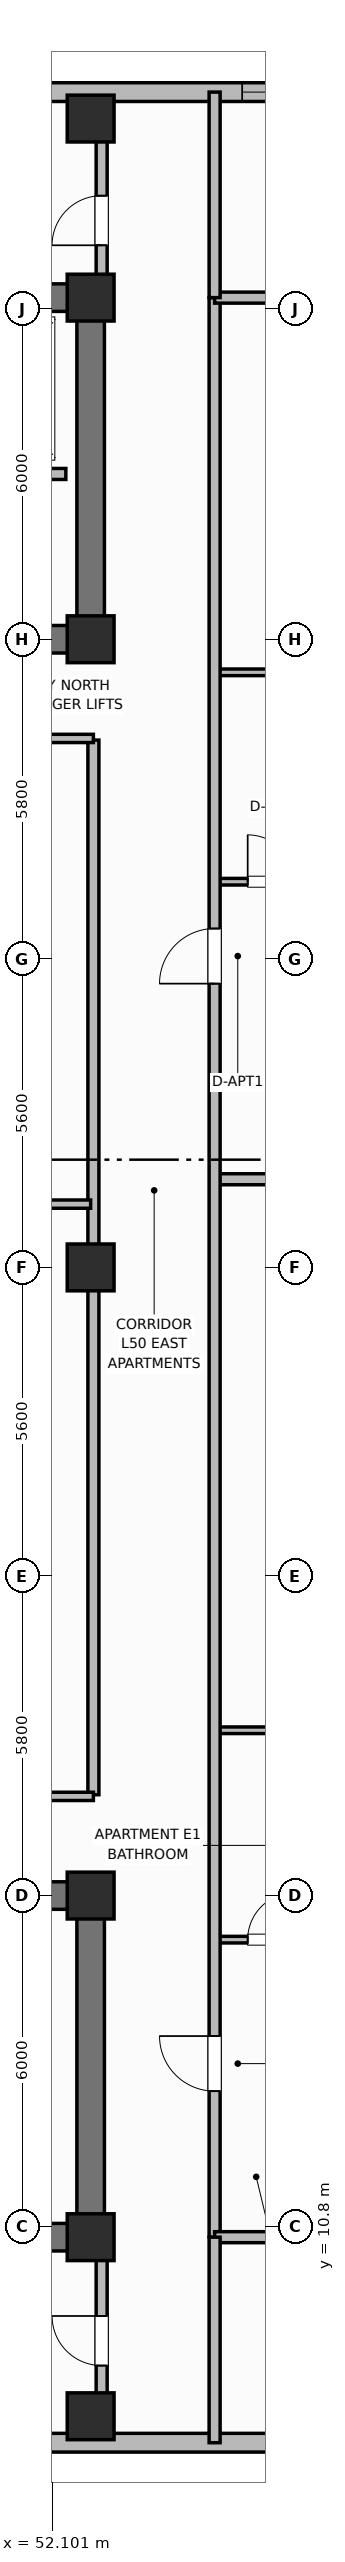
"""IFC4 building model, lengths in metres.
Left out: names, types, materials, properties, quantities, classifications, styles, units other than length and angle.
Written with IfcOpenShell. Run it as: python <this file> out.ifc"""

import sys

from ifc_helpers import new_model, si_unit, direction, frame, frame_2d, origin, origin_2d, place, context, subcontext, project, spatial, rectangle, extrude, element, fill, save


model = new_model("IFC4")
c1 = context("Model", 3, precision=1e-05, world=origin(), true_north=direction((0.0, 1.0)))
c2 = subcontext(c1, "Body", "Model", "MODEL_VIEW")
j1 = project(units=[si_unit("LENGTHUNIT", "METRE"), si_unit("PLANEANGLEUNIT", "RADIAN")], contexts=[c1])
p1 = place(None, origin())
s1 = spatial("IfcSite", under=j1, at=p1, CompositionType="ELEMENT")
p2 = place(p1, origin())
s2 = spatial("IfcBuilding", under=s1, at=p2, CompositionType="ELEMENT")
p3 = place(p2, frame((0.0, 0.0, 203.1)))
s3 = spatial("IfcBuildingStorey", under=s2, at=p3, CompositionType="ELEMENT", Elevation=203.1)
p4 = place(p3, frame((52.8, 10.6, 0.0), z_axis=(0.0, 0.0, 1.0), x_axis=(-1.0, 0.0, 0.0)))
e1 = element("IfcWall", 1, at=p4, inside=s3, PredefinedType="SHEAR", context=c2, shape_type="SweptSolid", body=[
    extrude(rectangle(XDim=27.2, YDim=0.5, at=frame_2d((13.6, 0.0))), origin(), (0.0, 0.0, 1.0), 4.2),
])
p5 = place(p3, frame((52.8, 10.85, 0.0), z_axis=(0.0, 0.0, 1.0), x_axis=(0.0, 1.0, 0.0)))
e2 = element("IfcWall", 2, at=p5, inside=s3, PredefinedType="SHEAR", context=c2, shape_type="SweptSolid", body=[
    extrude(rectangle(XDim=5.7, YDim=0.5, at=frame_2d((2.85, 0.0))), origin(), (0.0, 0.0, 1.0), 4.2),
])
p6 = place(p3, frame((25.6, 16.8, 0.0), z_axis=(0.0, 0.0, 1.0), x_axis=(1.0, 0.0, 0.0)))
e3 = element("IfcWall", 3, at=p6, inside=s3, PredefinedType="SHEAR", context=c2, shape_type="SweptSolid", body=[
    extrude(rectangle(XDim=27.2, YDim=0.5, at=frame_2d((13.6, 0.0))), origin(), (0.0, 0.0, 1.0), 4.2),
])
p7 = place(p6, frame((1.8, 0.0, 0.0)))
e4 = element("IfcOpeningElement", 4, at=p7, cuts=e3, PredefinedType="OPENING", context=c2, shape_type="SweptSolid", body=[
    extrude(rectangle(XDim=1.1, YDim=2.15, at=frame_2d((0.55, 1.075))), frame((0.0, 0.26, 0.0), z_axis=(0.0, -1.0, 0.0), x_axis=(1.0, 0.0, 0.0)), (0.0, 0.0, 1.0), 0.52),
])
p8 = place(p6, frame((5.6, 0.0, 0.0)))
e5 = element("IfcOpeningElement", 5, at=p8, cuts=e3, PredefinedType="OPENING", context=c2, shape_type="SweptSolid", body=[
    extrude(rectangle(XDim=0.85, YDim=2.1, at=frame_2d((0.425, 1.05))), frame((0.0, 0.26, 0.0), z_axis=(0.0, -1.0, 0.0), x_axis=(1.0, 0.0, 0.0)), (0.0, 0.0, 1.0), 0.52),
])
p9 = place(p6, frame((13.0, 0.0, 0.0)))
e6 = element("IfcOpeningElement", 6, at=p9, cuts=e3, PredefinedType="OPENING", context=c2, shape_type="SweptSolid", body=[
    extrude(rectangle(XDim=1.2, YDim=2.15, at=frame_2d((0.6, 1.075))), frame((0.0, 0.26, 0.0), z_axis=(0.0, -1.0, 0.0), x_axis=(1.0, 0.0, 0.0)), (0.0, 0.0, 1.0), 0.52),
])
p10 = place(p6, frame((19.2, 0.0, 0.0)))
e7 = element("IfcOpeningElement", 7, at=p10, cuts=e3, PredefinedType="OPENING", context=c2, shape_type="SweptSolid", body=[
    extrude(rectangle(XDim=0.85, YDim=2.1, at=frame_2d((0.425, 1.05))), frame((0.0, 0.26, 0.0), z_axis=(0.0, -1.0, 0.0), x_axis=(1.0, 0.0, 0.0)), (0.0, 0.0, 1.0), 0.52),
])
p11 = place(p6, frame((23.8, 0.0, 0.0)))
e8 = element("IfcOpeningElement", 8, at=p11, cuts=e3, PredefinedType="OPENING", context=c2, shape_type="SweptSolid", body=[
    extrude(rectangle(XDim=0.9, YDim=2.1, at=frame_2d((0.45, 1.05))), frame((0.0, 0.26, 0.0), z_axis=(0.0, -1.0, 0.0), x_axis=(1.0, 0.0, 0.0)), (0.0, 0.0, 1.0), 0.52),
])
p12 = place(p3, frame((25.6, 45.8, 0.0), z_axis=(0.0, 0.0, 1.0), x_axis=(1.0, 0.0, 0.0)))
e9 = element("IfcWall", 9, at=p12, inside=s3, PredefinedType="SHEAR", context=c2, shape_type="SweptSolid", body=[
    extrude(rectangle(XDim=27.2, YDim=0.5, at=frame_2d((13.6, 0.0))), origin(), (0.0, 0.0, 1.0), 4.2),
])
p13 = place(p3, frame((52.8, 39.85, 0.0), z_axis=(0.0, 0.0, 1.0), x_axis=(0.0, 1.0, 0.0)))
e10 = element("IfcWall", 10, at=p13, inside=s3, PredefinedType="SHEAR", context=c2, shape_type="SweptSolid", body=[
    extrude(rectangle(XDim=5.7, YDim=0.5, at=frame_2d((2.85, 0.0))), origin(), (0.0, 0.0, 1.0), 4.2),
])
p14 = place(p3, frame((52.8, 39.6, 0.0), z_axis=(0.0, 0.0, 1.0), x_axis=(-1.0, 0.0, 0.0)))
e11 = element("IfcWall", 11, at=p14, inside=s3, PredefinedType="SHEAR", context=c2, shape_type="SweptSolid", body=[
    extrude(rectangle(XDim=27.2, YDim=0.5, at=frame_2d((13.6, 0.0))), origin(), (0.0, 0.0, 1.0), 4.2),
])
p15 = place(p14, frame((24.2, 0.0, 0.0)))
e12 = element("IfcOpeningElement", 12, at=p15, cuts=e11, PredefinedType="OPENING", context=c2, shape_type="SweptSolid", body=[
    extrude(rectangle(XDim=1.1, YDim=2.15, at=frame_2d((0.55, 1.075))), frame((0.0, 0.26, 0.0), z_axis=(0.0, -1.0, 0.0), x_axis=(1.0, 0.0, 0.0)), (0.0, 0.0, 1.0), 0.52),
])
p16 = place(p14, frame((20.55, 0.0, 0.0)))
e13 = element("IfcOpeningElement", 13, at=p16, cuts=e11, PredefinedType="OPENING", context=c2, shape_type="SweptSolid", body=[
    extrude(rectangle(XDim=0.95, YDim=2.1, at=frame_2d((0.475, 1.05))), frame((0.0, 0.26, 0.0), z_axis=(0.0, -1.0, 0.0), x_axis=(1.0, 0.0, 0.0)), (0.0, 0.0, 1.0), 0.52),
])
p17 = place(p14, frame((15.1, 0.0, 0.0)))
e14 = element("IfcOpeningElement", 14, at=p17, cuts=e11, PredefinedType="OPENING", context=c2, shape_type="SweptSolid", body=[
    extrude(rectangle(XDim=1.2, YDim=2.15, at=frame_2d((0.6, 1.075))), frame((0.0, 0.26, 0.0), z_axis=(0.0, -1.0, 0.0), x_axis=(1.0, 0.0, 0.0)), (0.0, 0.0, 1.0), 0.52),
])
p18 = place(p14, frame((13.05, 0.0, 0.0)))
e15 = element("IfcOpeningElement", 15, at=p18, cuts=e11, PredefinedType="OPENING", context=c2, shape_type="SweptSolid", body=[
    extrude(rectangle(XDim=0.85, YDim=2.1, at=frame_2d((0.425, 1.05))), frame((0.0, 0.26, 0.0), z_axis=(0.0, -1.0, 0.0), x_axis=(1.0, 0.0, 0.0)), (0.0, 0.0, 1.0), 0.52),
])
p19 = place(p14, frame((11.0, 0.0, 0.0)))
e16 = element("IfcOpeningElement", 16, at=p19, cuts=e11, PredefinedType="OPENING", context=c2, shape_type="SweptSolid", body=[
    extrude(rectangle(XDim=0.85, YDim=2.1, at=frame_2d((0.425, 1.05))), frame((0.0, 0.26, 0.0), z_axis=(0.0, -1.0, 0.0), x_axis=(1.0, 0.0, 0.0)), (0.0, 0.0, 1.0), 0.52),
])
p20 = place(p14, frame((7.35, 0.0, 0.0)))
e17 = element("IfcOpeningElement", 17, at=p20, cuts=e11, PredefinedType="OPENING", context=c2, shape_type="SweptSolid", body=[
    extrude(rectangle(XDim=0.85, YDim=2.1, at=frame_2d((0.425, 1.05))), frame((0.0, 0.26, 0.0), z_axis=(0.0, -1.0, 0.0), x_axis=(1.0, 0.0, 0.0)), (0.0, 0.0, 1.0), 0.52),
])
p21 = place(p14, frame((4.2, 0.0, 0.0)))
e18 = element("IfcOpeningElement", 18, at=p21, cuts=e11, PredefinedType="OPENING", context=c2, shape_type="SweptSolid", body=[
    extrude(rectangle(XDim=1.3, YDim=2.2, at=frame_2d((0.65, 1.1))), frame((0.0, 0.26, 0.0), z_axis=(0.0, -1.0, 0.0), x_axis=(1.0, 0.0, 0.0)), (0.0, 0.0, 1.0), 0.52),
])
for number, where, z_axis, x_axis in (
    (19, (52.8, 10.6, 0.0), (0.0, 0.0, 1.0), (1.0, 0.0, 0.0)),
    (20, (52.8, 16.8, 0.0), (0.0, 0.0, 1.0), (1.0, 0.0, 0.0)),
    (21, (52.8, 39.6, 0.0), (0.0, 0.0, 1.0), (1.0, 0.0, 0.0)),
    (22, (52.8, 45.8, 0.0), (0.0, 0.0, 1.0), (1.0, 0.0, 0.0)),
    (23, (52.8, 28.2, 0.0), (0.0, 0.0, 1.0), (1.0, 0.0, 0.0)),
    (24, (52.8, 7.35, 0.0), (0.0, 0.0, 1.0), (1.0, 0.0, 0.0)),
    (25, (52.8, 49.05, 0.0), (0.0, 0.0, 1.0), (1.0, 0.0, 0.0)),
):
    element("IfcColumn", number, at=place(p3, frame(where, z_axis=z_axis, x_axis=x_axis)), inside=s3, PredefinedType="COLUMN", context=c2, shape_type="SweptSolid", body=[
        extrude(rectangle(XDim=0.85, YDim=0.85, at=origin_2d()), origin(), (0.0, 0.0, 1.0), 4.2),
    ])
p22 = place(p3, frame((51.25, 6.87, 0.0), z_axis=(0.0, 0.0, 1.0), x_axis=(1.0, 0.0, 0.0)))
e26 = element("IfcWall", 26, at=p22, inside=s3, PredefinedType="SOLIDWALL", context=c2, shape_type="SweptSolid", body=[
    extrude(rectangle(XDim=6.95, YDim=0.34, at=frame_2d((3.475, 0.0))), origin(), (0.0, 0.0, 1.0), 3.22),
])
p23 = place(p3, frame((58.2, 49.53, 0.0), z_axis=(0.0, 0.0, 1.0), x_axis=(-1.0, 0.0, 0.0)))
e27 = element("IfcWall", 27, at=p23, inside=s3, PredefinedType="SOLIDWALL", context=c2, shape_type="SweptSolid", body=[
    extrude(rectangle(XDim=15.8, YDim=0.34, at=frame_2d((7.9, 0.0))), origin(), (0.0, 0.0, 1.0), 3.22),
])
p24 = place(p23, frame((1.55, 0.0, 0.95)))
e28 = element("IfcOpeningElement", 28, at=p24, cuts=e27, PredefinedType="OPENING", context=c2, shape_type="SweptSolid", body=[
    extrude(rectangle(XDim=1.1, YDim=1.65, at=frame_2d((0.55, 0.825))), frame((0.0, 0.18, 0.0), z_axis=(0.0, -1.0, 0.0), x_axis=(1.0, 0.0, 0.0)), (0.0, 0.0, 1.0), 0.36),
])
p25 = place(p23, frame((7.35, 0.0, 0.95)))
e29 = element("IfcOpeningElement", 29, at=p25, cuts=e27, PredefinedType="OPENING", context=c2, shape_type="SweptSolid", body=[
    extrude(rectangle(XDim=1.1, YDim=1.65, at=frame_2d((0.55, 0.825))), frame((0.0, 0.18, 0.0), z_axis=(0.0, -1.0, 0.0), x_axis=(1.0, 0.0, 0.0)), (0.0, 0.0, 1.0), 0.36),
])
p26 = place(p23, frame((11.3, 0.0, 0.95)))
e30 = element("IfcOpeningElement", 30, at=p26, cuts=e27, PredefinedType="OPENING", context=c2, shape_type="SweptSolid", body=[
    extrude(rectangle(XDim=1.1, YDim=1.65, at=frame_2d((0.55, 0.825))), frame((0.0, 0.18, 0.0), z_axis=(0.0, -1.0, 0.0), x_axis=(1.0, 0.0, 0.0)), (0.0, 0.0, 1.0), 0.36),
])
p27 = place(p3, frame((52.35, 42.6, 0.0), z_axis=(0.0, 0.0, 1.0), x_axis=(-1.0, 0.0, 0.0)))
e31 = element("IfcWall", 31, at=p27, inside=s3, PredefinedType="PARTITIONING", context=c2, shape_type="SweptSolid", body=[
    extrude(rectangle(XDim=6.5, YDim=0.2, at=frame_2d((3.25, 0.0))), origin(), (0.0, 0.0, 1.0), 3.05),
])
p28 = place(p27, frame((4.9, 0.0, 0.0)))
e32 = element("IfcOpeningElement", 32, at=p28, cuts=e31, PredefinedType="OPENING", context=c2, shape_type="SweptSolid", body=[
    extrude(rectangle(XDim=1.0, YDim=2.15, at=frame_2d((0.5, 1.075))), frame((0.0, 0.11, 0.0), z_axis=(0.0, -1.0, 0.0), x_axis=(1.0, 0.0, 0.0)), (0.0, 0.0, 1.0), 0.22),
])
p29 = place(p27, frame((2.8, 0.0, 0.0)))
e33 = element("IfcOpeningElement", 33, at=p29, cuts=e31, PredefinedType="OPENING", context=c2, shape_type="SweptSolid", body=[
    extrude(rectangle(XDim=1.0, YDim=2.15, at=frame_2d((0.5, 1.075))), frame((0.0, 0.11, 0.0), z_axis=(0.0, -1.0, 0.0), x_axis=(1.0, 0.0, 0.0)), (0.0, 0.0, 1.0), 0.22),
])
p30 = place(p27, frame((0.7, 0.0, 0.0)))
e34 = element("IfcOpeningElement", 34, at=p30, cuts=e31, PredefinedType="OPENING", context=c2, shape_type="SweptSolid", body=[
    extrude(rectangle(XDim=1.0, YDim=2.15, at=frame_2d((0.5, 1.075))), frame((0.0, 0.11, 0.0), z_axis=(0.0, -1.0, 0.0), x_axis=(1.0, 0.0, 0.0)), (0.0, 0.0, 1.0), 0.22),
])
p31 = place(p3, frame((52.85, 18.63, 0.0), z_axis=(0.0, 0.0, 1.0), x_axis=(0.0, 1.0, 0.0)))
e35 = element("IfcWall", 35, at=p31, inside=s3, PredefinedType="PARTITIONING", context=c2, shape_type="SweptSolid", body=[
    extrude(rectangle(XDim=19.14, YDim=0.2, at=frame_2d((9.57, 0.0))), origin(), (0.0, 0.0, 1.0), 3.05),
])
for number, where, z_axis, x_axis in (
    (36, (31.35, 18.6, 0.0), (0.0, 0.0, 1.0), (1.0, 0.0, 0.0)),
    (37, (31.35, 37.8, 0.0), (0.0, 0.0, 1.0), (1.0, 0.0, 0.0)),
):
    element("IfcWall", number, at=place(p3, frame(where, z_axis=z_axis, x_axis=x_axis)), inside=s3, PredefinedType="PARTITIONING", context=c2, shape_type="SweptSolid", body=[
        extrude(rectangle(XDim=21.5, YDim=0.15, at=frame_2d((10.75, 0.0))), origin(), (0.0, 0.0, 1.0), 3.05),
    ])
p32 = place(p3, frame((31.38, 29.348, 0.0), z_axis=(0.0, 0.0, 1.0), x_axis=(1.0, 0.0, 0.0)))
e38 = element("IfcWall", 38, at=p32, inside=s3, PredefinedType="PARTITIONING", context=c2, shape_type="SweptSolid", body=[
    extrude(rectangle(XDim=21.42, YDim=0.15, at=frame_2d((10.71, 0.0))), origin(), (0.0, 0.0, 1.0), 3.05),
])
p33 = place(p3, frame((55.05, 16.0, 0.0), z_axis=(0.0, 0.0, 1.0), x_axis=(1.0, 0.0, 0.0)))
e39 = element("IfcWall", 39, at=p33, inside=s3, PredefinedType="PARTITIONING", context=c2, shape_type="SweptSolid", body=[
    extrude(rectangle(XDim=2.25, YDim=0.12, at=frame_2d((1.125, 0.0))), origin(), (0.0, 0.0, 1.0), 3.05),
])
p34 = place(p33, frame((0.6, 0.0, 0.0)))
e40 = element("IfcOpeningElement", 40, at=p34, cuts=e39, PredefinedType="OPENING", context=c2, shape_type="SweptSolid", body=[
    extrude(rectangle(XDim=0.85, YDim=2.1, at=frame_2d((0.425, 1.05))), frame((0.0, 0.07, 0.0), z_axis=(0.0, -1.0, 0.0), x_axis=(1.0, 0.0, 0.0)), (0.0, 0.0, 1.0), 0.14),
])
p35 = place(p3, frame((55.05, 19.8, 0.0), z_axis=(0.0, 0.0, 1.0), x_axis=(1.0, 0.0, 0.0)))
e41 = element("IfcWall", 41, at=p35, inside=s3, PredefinedType="PARTITIONING", context=c2, shape_type="SweptSolid", body=[
    extrude(rectangle(XDim=2.25, YDim=0.12, at=frame_2d((1.125, 0.0))), origin(), (0.0, 0.0, 1.0), 3.05),
])
p36 = place(p3, frame((55.05, 29.8, 0.0), z_axis=(0.0, 0.0, 1.0), x_axis=(1.0, 0.0, 0.0)))
e42 = element("IfcWall", 42, at=p36, inside=s3, PredefinedType="PARTITIONING", context=c2, shape_type="SweptSolid", body=[
    extrude(rectangle(XDim=6.38, YDim=0.2, at=frame_2d((3.19, 0.0))), origin(), (0.0, 0.0, 1.0), 3.05),
])
p37 = place(p3, frame((55.05, 35.2, 0.0), z_axis=(0.0, 0.0, 1.0), x_axis=(1.0, 0.0, 0.0)))
e43 = element("IfcWall", 43, at=p37, inside=s3, PredefinedType="PARTITIONING", context=c2, shape_type="SweptSolid", body=[
    extrude(rectangle(XDim=2.25, YDim=0.12, at=frame_2d((1.125, 0.0))), origin(), (0.0, 0.0, 1.0), 3.05),
])
p38 = place(p37, frame((0.6, 0.0, 0.0)))
e44 = element("IfcOpeningElement", 44, at=p38, cuts=e43, PredefinedType="OPENING", context=c2, shape_type="SweptSolid", body=[
    extrude(rectangle(XDim=0.85, YDim=2.1, at=frame_2d((0.425, 1.05))), frame((0.0, 0.07, 0.0), z_axis=(0.0, -1.0, 0.0), x_axis=(1.0, 0.0, 0.0)), (0.0, 0.0, 1.0), 0.14),
])
p39 = place(p3, frame((55.05, 39.0, 0.0), z_axis=(0.0, 0.0, 1.0), x_axis=(1.0, 0.0, 0.0)))
e45 = element("IfcWall", 45, at=p39, inside=s3, PredefinedType="PARTITIONING", context=c2, shape_type="SweptSolid", body=[
    extrude(rectangle(XDim=2.25, YDim=0.12, at=frame_2d((1.125, 0.0))), origin(), (0.0, 0.0, 1.0), 3.05),
])
p40 = place(p3, frame((55.05, 10.6, 0.0), z_axis=(0.0, 0.0, 1.0), x_axis=(0.0, 1.0, 0.0)))
e46 = element("IfcWall", 46, at=p40, inside=s3, PredefinedType="PARTITIONING", context=c2, shape_type="SweptSolid", body=[
    extrude(rectangle(XDim=35.2, YDim=0.2, at=frame_2d((17.6, 0.0))), origin(), (0.0, 0.0, 1.0), 3.05),
])
p41 = place(p40, frame((2.65, 0.0, 0.0)))
e47 = element("IfcOpeningElement", 47, at=p41, cuts=e46, PredefinedType="OPENING", context=c2, shape_type="SweptSolid", body=[
    extrude(rectangle(XDim=1.0, YDim=2.15, at=frame_2d((0.5, 1.075))), frame((0.0, 0.11, 0.0), z_axis=(0.0, -1.0, 0.0), x_axis=(1.0, 0.0, 0.0)), (0.0, 0.0, 1.0), 0.22),
])
p42 = place(p40, frame((22.75, 0.0, 0.0)))
e48 = element("IfcOpeningElement", 48, at=p42, cuts=e46, PredefinedType="OPENING", context=c2, shape_type="SweptSolid", body=[
    extrude(rectangle(XDim=1.0, YDim=2.15, at=frame_2d((0.5, 1.075))), frame((0.0, 0.11, 0.0), z_axis=(0.0, -1.0, 0.0), x_axis=(1.0, 0.0, 0.0)), (0.0, 0.0, 1.0), 0.22),
])
for number, where, z_axis, x_axis in (
    (49, (55.05, 10.6, 0.0), (0.0, 0.0, 1.0), (1.0, 0.0, 0.0)),
    (50, (55.05, 45.8, 0.0), (0.0, 0.0, 1.0), (1.0, 0.0, 0.0)),
):
    element("IfcWall", number, at=place(p3, frame(where, z_axis=z_axis, x_axis=x_axis)), inside=s3, PredefinedType="PARTITIONING", context=c2, shape_type="SweptSolid", body=[
        extrude(rectangle(XDim=6.36, YDim=0.2, at=frame_2d((3.18, 0.0))), origin(), (0.0, 0.0, 1.0), 3.05),
    ])
for number, where, z_axis, x_axis in (
    (51, (55.05, 6.87, 0.0), (0.0, 0.0, 1.0), (0.0, 1.0, 0.0)),
    (52, (55.05, 45.8, 0.0), (0.0, 0.0, 1.0), (0.0, 1.0, 0.0)),
):
    element("IfcWall", number, at=place(p3, frame(where, z_axis=z_axis, x_axis=x_axis)), inside=s3, PredefinedType="PARTITIONING", context=c2, shape_type="SweptSolid", body=[
        extrude(rectangle(XDim=3.73, YDim=0.2, at=frame_2d((1.865, 0.0))), origin(), (0.0, 0.0, 1.0), 3.05),
    ])
p43 = place(p3, frame((53.0, 7.62, 0.0), z_axis=(0.0, 0.0, 1.0), x_axis=(0.0, 1.0, 0.0)))
e53 = element("IfcWall", 53, at=p43, inside=s3, PredefinedType="PARTITIONING", context=c2, shape_type="SweptSolid", body=[
    extrude(rectangle(XDim=2.68, YDim=0.2, at=frame_2d((1.34, 0.0))), origin(), (0.0, 0.0, 1.0), 3.05),
])
p44 = place(p43, frame((0.65, 0.0, 0.0)))
e54 = element("IfcOpeningElement", 54, at=p44, cuts=e53, PredefinedType="OPENING", context=c2, shape_type="SweptSolid", body=[
    extrude(rectangle(XDim=0.9, YDim=2.1, at=frame_2d((0.45, 1.05))), frame((0.0, 0.11, 0.0), z_axis=(0.0, -1.0, 0.0), x_axis=(1.0, 0.0, 0.0)), (0.0, 0.0, 1.0), 0.22),
])
p45 = place(p3, frame((53.0, 46.1, 0.0), z_axis=(0.0, 0.0, 1.0), x_axis=(0.0, 1.0, 0.0)))
e55 = element("IfcWall", 55, at=p45, inside=s3, PredefinedType="PARTITIONING", context=c2, shape_type="SweptSolid", body=[
    extrude(rectangle(XDim=2.68, YDim=0.2, at=frame_2d((1.34, 0.0))), origin(), (0.0, 0.0, 1.0), 3.05),
])
p46 = place(p45, frame((0.65, 0.0, 0.0)))
e56 = element("IfcOpeningElement", 56, at=p46, cuts=e55, PredefinedType="OPENING", context=c2, shape_type="SweptSolid", body=[
    extrude(rectangle(XDim=0.9, YDim=2.1, at=frame_2d((0.45, 1.05))), frame((0.0, 0.11, 0.0), z_axis=(0.0, -1.0, 0.0), x_axis=(1.0, 0.0, 0.0)), (0.0, 0.0, 1.0), 0.22),
])
p47 = place(p24, origin())
e57 = element("IfcWindow", 57, at=p47, inside=s3, PartitioningType="SINGLE_PANEL", PredefinedType="WINDOW", context=c2, shape_type="SweptSolid", body=[
    extrude(rectangle(XDim=1.1, YDim=1.65, at=frame_2d((0.55, 0.825))), frame((0.0, 0.03, 0.0), z_axis=(0.0, -1.0, 0.0), x_axis=(1.0, 0.0, 0.0)), (0.0, 0.0, 1.0), 0.06),
])
fill(e28, e57)
p48 = place(p34, origin())
e58 = element("IfcDoor", 58, at=p48, inside=s3, OperationType="SINGLE_SWING_RIGHT", PredefinedType="DOOR", context=c2, shape_type="SweptSolid", body=[
    extrude(rectangle(XDim=0.85, YDim=2.1, at=frame_2d((0.425, 1.05))), frame((0.0, 0.025, 0.0), z_axis=(0.0, -1.0, 0.0), x_axis=(1.0, 0.0, 0.0)), (0.0, 0.0, 1.0), 0.05),
])
fill(e40, e58)
p49 = place(p38, origin())
e59 = element("IfcDoor", 59, at=p49, inside=s3, OperationType="SINGLE_SWING_LEFT", PredefinedType="DOOR", context=c2, shape_type="SweptSolid", body=[
    extrude(rectangle(XDim=0.85, YDim=2.1, at=frame_2d((0.425, 1.05))), frame((0.0, 0.025, 0.0), z_axis=(0.0, -1.0, 0.0), x_axis=(1.0, 0.0, 0.0)), (0.0, 0.0, 1.0), 0.05),
])
fill(e44, e59)
p50 = place(p41, origin())
e60 = element("IfcDoor", 60, at=p50, inside=s3, OperationType="SINGLE_SWING_RIGHT", PredefinedType="DOOR", context=c2, shape_type="SweptSolid", body=[
    extrude(rectangle(XDim=1.0, YDim=2.15, at=frame_2d((0.5, 1.075))), frame((0.0, 0.025, 0.0), z_axis=(0.0, -1.0, 0.0), x_axis=(1.0, 0.0, 0.0)), (0.0, 0.0, 1.0), 0.05),
])
fill(e47, e60)
p51 = place(p42, origin())
e61 = element("IfcDoor", 61, at=p51, inside=s3, OperationType="SINGLE_SWING_LEFT", PredefinedType="DOOR", context=c2, shape_type="SweptSolid", body=[
    extrude(rectangle(XDim=1.0, YDim=2.15, at=frame_2d((0.5, 1.075))), frame((0.0, 0.025, 0.0), z_axis=(0.0, -1.0, 0.0), x_axis=(1.0, 0.0, 0.0)), (0.0, 0.0, 1.0), 0.05),
])
fill(e48, e61)
p52 = place(p44, origin())
e62 = element("IfcDoor", 62, at=p52, inside=s3, OperationType="SINGLE_SWING_RIGHT", PredefinedType="DOOR", context=c2, shape_type="SweptSolid", body=[
    extrude(rectangle(XDim=0.9, YDim=2.1, at=frame_2d((0.45, 1.05))), frame((0.0, 0.025, 0.0), z_axis=(0.0, -1.0, 0.0), x_axis=(1.0, 0.0, 0.0)), (0.0, 0.0, 1.0), 0.05),
])
fill(e54, e62)
p53 = place(p46, origin())
e63 = element("IfcDoor", 63, at=p53, inside=s3, OperationType="SINGLE_SWING_LEFT", PredefinedType="DOOR", context=c2, shape_type="SweptSolid", body=[
    extrude(rectangle(XDim=0.9, YDim=2.1, at=frame_2d((0.45, 1.05))), frame((0.0, 0.025, 0.0), z_axis=(0.0, -1.0, 0.0), x_axis=(1.0, 0.0, 0.0)), (0.0, 0.0, 1.0), 0.05),
])
fill(e56, e63)
save(model, sys.argv[1])
